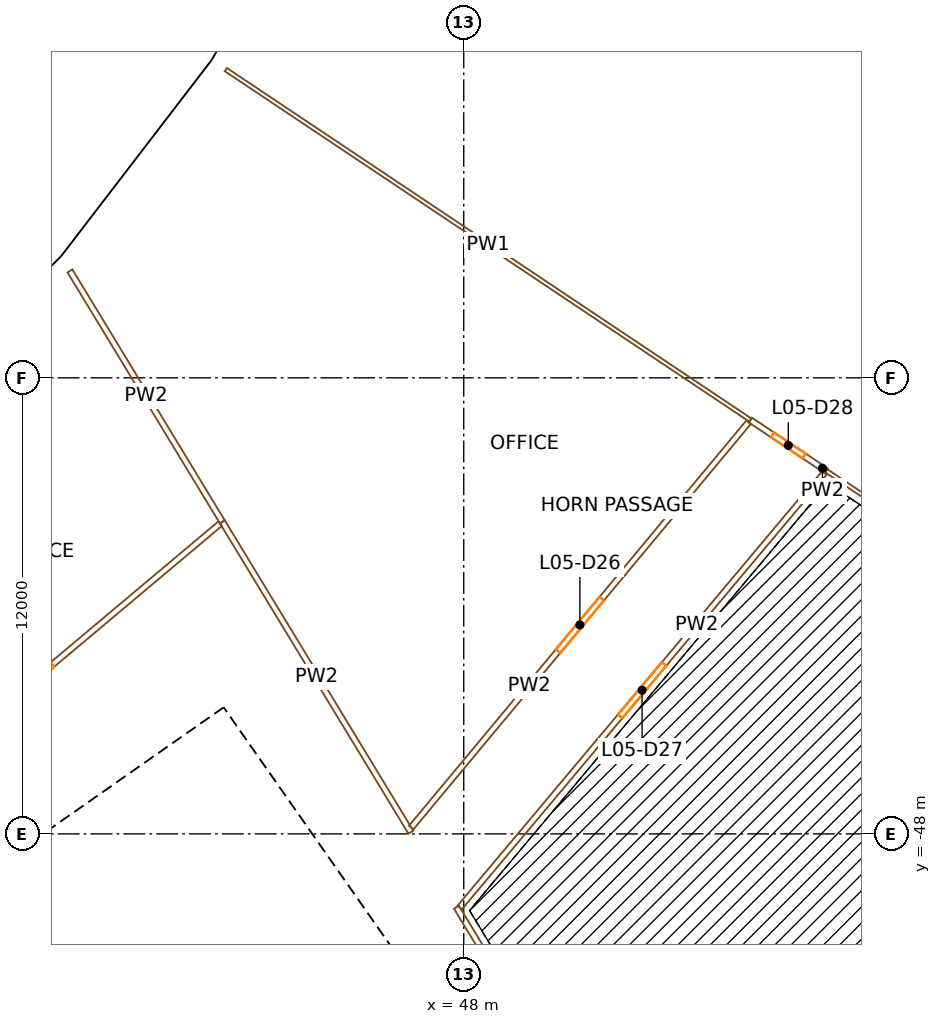
"""IFC4 building model, lengths in metres.
Left out: names, types, materials, properties, quantities, classifications, styles, units other than length and angle.
Written with IfcOpenShell. Run it as: python <this file> out.ifc"""

import sys

from ifc_helpers import new_model, si_unit, direction, frame, frame_2d, origin, origin_2d, place, context, subcontext, project, spatial, rectangle, extrude, element, fill, save


model = new_model("IFC4")
c1 = context("Model", 3, precision=1e-05, world=origin(), true_north=direction((0.0, 1.0)))
c2 = subcontext(c1, "Body", "Model", "MODEL_VIEW")
j1 = project(units=[si_unit("LENGTHUNIT", "METRE"), si_unit("PLANEANGLEUNIT", "RADIAN")], contexts=[c1])
p1 = place(None, origin())
s1 = spatial("IfcSite", under=j1, at=p1, CompositionType="ELEMENT")
p2 = place(p1, origin())
s2 = spatial("IfcBuilding", under=s1, at=p2, CompositionType="ELEMENT")
p3 = place(p2, frame((0.0, 0.0, 36.0)))
s3 = spatial("IfcBuildingStorey", under=s2, at=p3, CompositionType="ELEMENT", Elevation=36.0)
p4 = place(p3, frame((38.407, -43.795, 0.0), z_axis=(0.0, 0.0, 1.0), x_axis=(0.751839807479, 0.6593458151, 0.0)))
e1 = element("IfcColumn", 1, at=p4, inside=s3, PredefinedType="COLUMN", context=c2, shape_type="SweptSolid", body=[
    extrude(rectangle(XDim=1.4, YDim=1.8, at=origin_2d()), origin(), (0.0, 0.0, 1.0), 4.5),
])
p5 = place(p3, frame((38.156, -33.462, 0.0), z_axis=(0.0, 0.0, 1.0), x_axis=(0.6593458151, 0.751839807479, 0.0)))
e2 = element("IfcColumn", 2, at=p5, inside=s3, PredefinedType="COLUMN", context=c2, shape_type="SweptSolid", body=[
    extrude(rectangle(XDim=1.1, YDim=1.3, at=origin_2d()), origin(), (0.0, 0.0, 1.0), 4.5),
])
for number, where, z_axis, x_axis in (
    (3, (43.795, -38.407, 0.0), (0.0, 0.0, 1.0), (0.659, 0.752, 0.0)),
    (4, (58.456, -51.264, 0.0), (0.0, 0.0, 1.0), (0.659, 0.752, 0.0)),
):
    element("IfcColumn", number, at=place(p3, frame(where, z_axis=z_axis, x_axis=x_axis)), inside=s3, PredefinedType="COLUMN", context=c2, shape_type="SweptSolid", body=[
        extrude(rectangle(XDim=1.4, YDim=1.8, at=origin_2d()), origin(), (0.0, 0.0, 1.0), 4.5),
    ])
p6 = place(p3, frame((42.197, -28.195, 0.0), z_axis=(0.0, 0.0, 1.0), x_axis=(0.55557023302, 0.831469612303, 0.0)))
e5 = element("IfcColumn", 5, at=p6, inside=s3, PredefinedType="COLUMN", context=c2, shape_type="SweptSolid", body=[
    extrude(rectangle(XDim=1.1, YDim=1.3, at=origin_2d()), origin(), (0.0, 0.0, 1.0), 4.5),
])
p7 = place(p3, frame((48.433, -32.362, 0.0), z_axis=(0.0, 0.0, 1.0), x_axis=(0.55557023302, 0.831469612303, 0.0)))
e6 = element("IfcColumn", 6, at=p7, inside=s3, PredefinedType="COLUMN", context=c2, shape_type="SweptSolid", body=[
    extrude(rectangle(XDim=1.4, YDim=1.8, at=origin_2d()), origin(), (0.0, 0.0, 1.0), 4.5),
])
p8 = place(p3, frame((49.779, -57.191, 0.0), z_axis=(0.0, 0.0, 1.0), x_axis=(-0.573577477574, 0.819151315216, 0.0)))
e7 = element("IfcWall", 7, at=p8, inside=s3, PredefinedType="SHEAR", context=c2, shape_type="SweptSolid", body=[
    extrude(rectangle(XDim=14.8, YDim=0.9, at=frame_2d((7.4, 0.0))), origin(), (0.0, 0.0, 1.0), 4.2),
])
p9 = place(p8, frame((6.7, 0.0, 0.0)))
e8 = element("IfcOpeningElement", 8, at=p9, cuts=e7, PredefinedType="OPENING", context=c2, shape_type="SweptSolid", body=[
    extrude(rectangle(XDim=1.4, YDim=2.1, at=frame_2d((0.7, 1.05))), frame((0.0, 0.46, 0.0), z_axis=(0.0, -1.0, 0.0), x_axis=(1.0, 0.0, 0.0)), (0.0, 0.0, 1.0), 0.92),
])
p10 = place(p3, frame((28.854, -54.324, 0.0), z_axis=(0.0, 0.0, 1.0), x_axis=(0.819145767589, 0.573585400304, 0.0)))
e9 = element("IfcWall", 9, at=p10, inside=s3, PredefinedType="SHEAR", context=c2, shape_type="SweptSolid", body=[
    extrude(rectangle(XDim=15.045, YDim=0.9, at=frame_2d((7.523, 0.0))), origin(), (0.0, 0.0, 1.0), 4.2),
])
p11 = place(p10, frame((1.05, 0.0, 0.0)))
e10 = element("IfcOpeningElement", 10, at=p11, cuts=e9, PredefinedType="OPENING", context=c2, shape_type="SweptSolid", body=[
    extrude(rectangle(XDim=0.9, YDim=2.1, at=frame_2d((0.45, 1.05))), frame((0.0, 0.46, 0.0), z_axis=(0.0, -1.0, 0.0), x_axis=(1.0, 0.0, 0.0)), (0.0, 0.0, 1.0), 0.92),
])
p12 = place(p10, frame((3.775, 0.0, 0.0)))
e11 = element("IfcOpeningElement", 11, at=p12, cuts=e9, PredefinedType="OPENING", context=c2, shape_type="SweptSolid", body=[
    extrude(rectangle(XDim=1.0, YDim=2.1, at=frame_2d((0.5, 1.05))), frame((0.0, 0.46, 0.0), z_axis=(0.0, -1.0, 0.0), x_axis=(1.0, 0.0, 0.0)), (0.0, 0.0, 1.0), 0.92),
])
p13 = place(p10, frame((6.275, 0.0, 0.0)))
e12 = element("IfcOpeningElement", 12, at=p13, cuts=e9, PredefinedType="OPENING", context=c2, shape_type="SweptSolid", body=[
    extrude(rectangle(XDim=1.0, YDim=2.1, at=frame_2d((0.5, 1.05))), frame((0.0, 0.46, 0.0), z_axis=(0.0, -1.0, 0.0), x_axis=(1.0, 0.0, 0.0)), (0.0, 0.0, 1.0), 0.92),
])
p14 = place(p10, frame((13.495, 0.0, 0.0)))
e13 = element("IfcOpeningElement", 13, at=p14, cuts=e9, PredefinedType="OPENING", context=c2, shape_type="SweptSolid", body=[
    extrude(rectangle(XDim=1.1, YDim=2.1, at=frame_2d((0.55, 1.05))), frame((0.0, 0.46, 0.0), z_axis=(0.0, -1.0, 0.0), x_axis=(1.0, 0.0, 0.0)), (0.0, 0.0, 1.0), 0.92),
])
p15 = place(p3, frame((43.204, -60.696, 0.0), z_axis=(0.0, 0.0, 1.0), x_axis=(-0.573571992966, 0.819155155563, 0.0)))
e14 = element("IfcWall", 14, at=p15, inside=s3, PredefinedType="SOLIDWALL", context=c2, shape_type="SweptSolid", body=[
    extrude(rectangle(XDim=13.0, YDim=0.3, at=frame_2d((6.5, 0.0))), origin(), (0.0, 0.0, 1.0), 4.2),
])
p16 = place(p3, frame((37.936, -52.91, 0.0), z_axis=(0.0, 0.0, 1.0), x_axis=(0.819147518138, 0.57358290031, 0.0)))
e15 = element("IfcWall", 15, at=p16, inside=s3, PredefinedType="SOLIDWALL", context=c2, shape_type="SweptSolid", body=[
    extrude(rectangle(XDim=6.795, YDim=0.3, at=frame_2d((3.398, 0.0))), origin(), (0.0, 0.0, 1.0), 4.2),
])
p17 = place(p16, frame((5.32, 0.0, 0.0)))
e16 = element("IfcOpeningElement", 16, at=p17, cuts=e15, PredefinedType="OPENING", context=c2, shape_type="SweptSolid", body=[
    extrude(rectangle(XDim=1.1, YDim=2.1, at=frame_2d((0.55, 1.05))), frame((0.0, 0.16, 0.0), z_axis=(0.0, -1.0, 0.0), x_axis=(1.0, 0.0, 0.0)), (0.0, 0.0, 1.0), 0.32),
])
p18 = place(p3, frame((37.532, -32.993, 0.0), z_axis=(0.0, 0.0, 1.0), x_axis=(-0.707106781187, -0.707106781187, 0.0)))
e17 = element("IfcWall", 17, at=p18, inside=s3, PredefinedType="SOLIDWALL", context=c2, shape_type="SweptSolid", body=[
    extrude(rectangle(XDim=6.419, YDim=0.45, at=frame_2d((3.209, 0.0))), origin(), (0.0, 0.0, 1.0), 3.2),
])
p19 = place(p18, frame((3.66, 0.0, 0.9)))
e18 = element("IfcOpeningElement", 18, at=p19, cuts=e17, PredefinedType="OPENING", context=c2, shape_type="SweptSolid", body=[
    extrude(rectangle(XDim=1.2, YDim=2.15, at=frame_2d((0.6, 1.075))), frame((0.0, 0.235, 0.0), z_axis=(0.0, -1.0, 0.0), x_axis=(1.0, 0.0, 0.0)), (0.0, 0.0, 1.0), 0.47),
])
p20 = place(p18, frame((1.56, 0.0, 0.9)))
e19 = element("IfcOpeningElement", 19, at=p20, cuts=e17, PredefinedType="OPENING", context=c2, shape_type="SweptSolid", body=[
    extrude(rectangle(XDim=1.2, YDim=2.15, at=frame_2d((0.6, 1.075))), frame((0.0, 0.235, 0.0), z_axis=(0.0, -1.0, 0.0), x_axis=(1.0, 0.0, 0.0)), (0.0, 0.0, 1.0), 0.47),
])
p21 = place(p3, frame((41.571, -27.741, 0.0), z_axis=(0.0, 0.0, 1.0), x_axis=(-0.608780327927, -0.793338838284, 0.0)))
e20 = element("IfcWall", 20, at=p21, inside=s3, PredefinedType="SOLIDWALL", context=c2, shape_type="SweptSolid", body=[
    extrude(rectangle(XDim=6.597, YDim=0.45, at=frame_2d((3.298, 0.0))), origin(), (0.0, 0.0, 1.0), 3.2),
])
p22 = place(p21, frame((3.749, 0.0, 0.9)))
e21 = element("IfcOpeningElement", 21, at=p22, cuts=e20, PredefinedType="OPENING", context=c2, shape_type="SweptSolid", body=[
    extrude(rectangle(XDim=1.2, YDim=2.15, at=frame_2d((0.6, 1.075))), frame((0.0, 0.235, 0.0), z_axis=(0.0, -1.0, 0.0), x_axis=(1.0, 0.0, 0.0)), (0.0, 0.0, 1.0), 0.47),
])
p23 = place(p21, frame((1.648, 0.0, 0.9)))
e22 = element("IfcOpeningElement", 22, at=p23, cuts=e20, PredefinedType="OPENING", context=c2, shape_type="SweptSolid", body=[
    extrude(rectangle(XDim=1.2, YDim=2.15, at=frame_2d((0.6, 1.075))), frame((0.0, 0.235, 0.0), z_axis=(0.0, -1.0, 0.0), x_axis=(1.0, 0.0, 0.0)), (0.0, 0.0, 1.0), 0.47),
])
p24 = place(p3, frame((44.792, -22.155, 0.0), z_axis=(0.0, 0.0, 1.0), x_axis=(-0.50000447882, -0.866022817921, 0.0)))
e23 = element("IfcWall", 23, at=p24, inside=s3, PredefinedType="SOLIDWALL", context=c2, shape_type="SweptSolid", body=[
    extrude(rectangle(XDim=6.419, YDim=0.45, at=frame_2d((3.21, 0.0))), origin(), (0.0, 0.0, 1.0), 3.2),
])
p25 = place(p24, frame((3.66, 0.0, 0.9)))
e24 = element("IfcOpeningElement", 24, at=p25, cuts=e23, PredefinedType="OPENING", context=c2, shape_type="SweptSolid", body=[
    extrude(rectangle(XDim=1.2, YDim=2.15, at=frame_2d((0.6, 1.075))), frame((0.0, 0.235, 0.0), z_axis=(0.0, -1.0, 0.0), x_axis=(1.0, 0.0, 0.0)), (0.0, 0.0, 1.0), 0.47),
])
p26 = place(p24, frame((1.56, 0.0, 0.9)))
e25 = element("IfcOpeningElement", 25, at=p26, cuts=e23, PredefinedType="OPENING", context=c2, shape_type="SweptSolid", body=[
    extrude(rectangle(XDim=1.2, YDim=2.15, at=frame_2d((0.6, 1.075))), frame((0.0, 0.235, 0.0), z_axis=(0.0, -1.0, 0.0), x_axis=(1.0, 0.0, 0.0)), (0.0, 0.0, 1.0), 0.47),
])
p27 = place(p3, frame((32.001, -47.893, 0.0), z_axis=(0.0, 0.0, 1.0), x_axis=(0.765734049768, 0.643157340801, 0.0)))
e26 = element("IfcWall", 26, at=p27, inside=s3, PredefinedType="PARTITIONING", context=c2, shape_type="SweptSolid", body=[
    extrude(rectangle(XDim=12.524, YDim=0.15, at=frame_2d((6.262, 0.0))), origin(), (0.0, 0.0, 1.0), 3.1),
])
p28 = place(p27, frame((5.762, 0.0, 0.0)))
e27 = element("IfcOpeningElement", 27, at=p28, cuts=e26, PredefinedType="OPENING", context=c2, shape_type="SweptSolid", body=[
    extrude(rectangle(XDim=1.0, YDim=2.1, at=frame_2d((0.5, 1.05))), frame((0.0, 0.085, 0.0), z_axis=(0.0, -1.0, 0.0), x_axis=(1.0, 0.0, 0.0)), (0.0, 0.0, 1.0), 0.17),
])
p29 = place(p3, frame((37.638, -33.187, 0.0), z_axis=(0.0, 0.0, 1.0), x_axis=(0.519163683086, -0.854674833, 0.0)))
e28 = element("IfcWall", 28, at=p29, inside=s3, PredefinedType="PARTITIONING", context=c2, shape_type="SweptSolid", body=[
    extrude(rectangle(XDim=7.725, YDim=0.15, at=frame_2d((3.862, 0.0))), origin(), (0.0, 0.0, 1.0), 3.1),
])
p30 = place(p3, frame((41.648, -39.789, 0.0), z_axis=(0.0, 0.0, 1.0), x_axis=(0.519144162426, -0.854686690325, 0.0)))
e29 = element("IfcWall", 29, at=p30, inside=s3, PredefinedType="PARTITIONING", context=c2, shape_type="SweptSolid", body=[
    extrude(rectangle(XDim=9.554, YDim=0.15, at=frame_2d((4.777, 0.0))), origin(), (0.0, 0.0, 1.0), 3.1),
])
p31 = place(p3, frame((46.617, -47.833, 0.0), z_axis=(0.0, 0.0, 1.0), x_axis=(0.639786242962, 0.768552902093, 0.0)))
e30 = element("IfcWall", 30, at=p31, inside=s3, PredefinedType="PARTITIONING", context=c2, shape_type="SweptSolid", body=[
    extrude(rectangle(XDim=13.875, YDim=0.15, at=frame_2d((6.938, 0.0))), origin(), (0.0, 0.0, 1.0), 3.1),
])
p32 = place(p31, frame((6.037, 0.0, 0.0)))
e31 = element("IfcOpeningElement", 31, at=p32, cuts=e30, PredefinedType="OPENING", context=c2, shape_type="SweptSolid", body=[
    extrude(rectangle(XDim=1.8, YDim=2.1, at=frame_2d((0.9, 1.05))), frame((0.0, 0.085, 0.0), z_axis=(0.0, -1.0, 0.0), x_axis=(1.0, 0.0, 0.0)), (0.0, 0.0, 1.0), 0.17),
])
p33 = place(p3, frame((47.808, -49.929, 0.0), z_axis=(0.0, 0.0, 1.0), x_axis=(0.519169679695, -0.854671190392, 0.0)))
e32 = element("IfcWall", 32, at=p33, inside=s3, PredefinedType="PARTITIONING", context=c2, shape_type="SweptSolid", body=[
    extrude(rectangle(XDim=9.878, YDim=0.15, at=frame_2d((4.939, 0.0))), origin(), (0.0, 0.0, 1.0), 3.1),
])
p34 = place(p3, frame((57.49, -38.503, 0.0), z_axis=(0.0, 0.0, 1.0), x_axis=(-0.642835259292, -0.766004457828, 0.0)))
e33 = element("IfcWall", 33, at=p34, inside=s3, PredefinedType="PARTITIONING", context=c2, shape_type="SweptSolid", body=[
    extrude(rectangle(XDim=14.926, YDim=0.15, at=frame_2d((7.463, 0.0))), origin(), (0.0, 0.0, 1.0), 3.1),
])
p35 = place(p34, frame((6.563, 0.0, 0.0)))
e34 = element("IfcOpeningElement", 34, at=p35, cuts=e33, PredefinedType="OPENING", context=c2, shape_type="SweptSolid", body=[
    extrude(rectangle(XDim=1.8, YDim=2.1, at=frame_2d((0.9, 1.05))), frame((0.0, 0.085, 0.0), z_axis=(0.0, -1.0, 0.0), x_axis=(1.0, 0.0, 0.0)), (0.0, 0.0, 1.0), 0.17),
])
p36 = place(p3, frame((55.542, -37.112, 0.0), z_axis=(0.0, 0.0, 1.0), x_axis=(-0.831472868546, 0.555565359677, 0.0)))
e35 = element("IfcWall", 35, at=p36, inside=s3, PredefinedType="PARTITIONING", context=c2, shape_type="SweptSolid", body=[
    extrude(rectangle(XDim=16.6, YDim=0.1, at=frame_2d((8.3, 0.0))), origin(), (0.0, 0.0, 1.0), 3.1),
])
p37 = place(p3, frame((55.542, -37.112, 0.0), z_axis=(0.0, 0.0, 1.0), x_axis=(0.831423745392, -0.555638871569, 0.0)))
e36 = element("IfcWall", 36, at=p37, inside=s3, PredefinedType="PARTITIONING", context=c2, shape_type="SweptSolid", body=[
    extrude(rectangle(XDim=2.4, YDim=0.15, at=frame_2d((1.2, 0.0))), origin(), (0.0, 0.0, 1.0), 3.1),
])
p38 = place(p37, frame((0.7, 0.0, 0.0)))
e37 = element("IfcOpeningElement", 37, at=p38, cuts=e36, PredefinedType="OPENING", context=c2, shape_type="SweptSolid", body=[
    extrude(rectangle(XDim=1.0, YDim=2.1, at=frame_2d((0.5, 1.05))), frame((0.0, 0.085, 0.0), z_axis=(0.0, -1.0, 0.0), x_axis=(1.0, 0.0, 0.0)), (0.0, 0.0, 1.0), 0.17),
])
p39 = place(p3, frame((71.34, -47.668, 0.0), z_axis=(0.0, 0.0, 1.0), x_axis=(-0.831472868546, 0.555565359677, 0.0)))
e38 = element("IfcWall", 38, at=p39, inside=s3, PredefinedType="PARTITIONING", context=c2, shape_type="SweptSolid", body=[
    extrude(rectangle(XDim=16.6, YDim=0.1, at=frame_2d((8.3, 0.0))), origin(), (0.0, 0.0, 1.0), 3.1),
])
p40 = place(p9, origin())
e39 = element("IfcDoor", 39, at=p40, inside=s3, OperationType="DOUBLE_DOOR_SINGLE_SWING", PredefinedType="DOOR", context=c2, shape_type="SweptSolid", body=[
    extrude(rectangle(XDim=1.4, YDim=2.1, at=frame_2d((0.7, 1.05))), frame((0.0, 0.025, 0.0), z_axis=(0.0, -1.0, 0.0), x_axis=(1.0, 0.0, 0.0)), (0.0, 0.0, 1.0), 0.05),
])
fill(e8, e39)
p41 = place(p14, origin())
e40 = element("IfcDoor", 40, at=p41, inside=s3, OperationType="SINGLE_SWING_RIGHT", PredefinedType="DOOR", context=c2, shape_type="SweptSolid", body=[
    extrude(rectangle(XDim=1.1, YDim=2.1, at=frame_2d((0.55, 1.05))), frame((0.0, 0.025, 0.0), z_axis=(0.0, -1.0, 0.0), x_axis=(1.0, 0.0, 0.0)), (0.0, 0.0, 1.0), 0.05),
])
fill(e13, e40)
p42 = place(p17, origin())
e41 = element("IfcDoor", 41, at=p42, inside=s3, OperationType="SINGLE_SWING_LEFT", PredefinedType="DOOR", context=c2, shape_type="SweptSolid", body=[
    extrude(rectangle(XDim=1.1, YDim=2.1, at=frame_2d((0.55, 1.05))), frame((0.0, 0.025, 0.0), z_axis=(0.0, -1.0, 0.0), x_axis=(1.0, 0.0, 0.0)), (0.0, 0.0, 1.0), 0.05),
])
fill(e16, e41)
p43 = place(p22, origin())
e42 = element("IfcWindow", 42, at=p43, inside=s3, PartitioningType="SINGLE_PANEL", PredefinedType="WINDOW", context=c2, shape_type="SweptSolid", body=[
    extrude(rectangle(XDim=1.2, YDim=2.15, at=frame_2d((0.6, 1.075))), frame((0.0, 0.03, 0.0), z_axis=(0.0, -1.0, 0.0), x_axis=(1.0, 0.0, 0.0)), (0.0, 0.0, 1.0), 0.06),
])
fill(e21, e42)
p44 = place(p23, origin())
e43 = element("IfcWindow", 43, at=p44, inside=s3, PartitioningType="SINGLE_PANEL", PredefinedType="WINDOW", context=c2, shape_type="SweptSolid", body=[
    extrude(rectangle(XDim=1.2, YDim=2.15, at=frame_2d((0.6, 1.075))), frame((0.0, 0.03, 0.0), z_axis=(0.0, -1.0, 0.0), x_axis=(1.0, 0.0, 0.0)), (0.0, 0.0, 1.0), 0.06),
])
fill(e22, e43)
p45 = place(p28, origin())
e44 = element("IfcDoor", 44, at=p45, inside=s3, OperationType="SINGLE_SWING_RIGHT", PredefinedType="DOOR", context=c2, shape_type="SweptSolid", body=[
    extrude(rectangle(XDim=1.0, YDim=2.1, at=frame_2d((0.5, 1.05))), frame((0.0, 0.025, 0.0), z_axis=(0.0, -1.0, 0.0), x_axis=(1.0, 0.0, 0.0)), (0.0, 0.0, 1.0), 0.05),
])
fill(e27, e44)
p46 = place(p32, origin())
e45 = element("IfcDoor", 45, at=p46, inside=s3, OperationType="DOUBLE_DOOR_SINGLE_SWING", PredefinedType="DOOR", context=c2, shape_type="SweptSolid", body=[
    extrude(rectangle(XDim=1.8, YDim=2.1, at=frame_2d((0.9, 1.05))), frame((0.0, 0.025, 0.0), z_axis=(0.0, -1.0, 0.0), x_axis=(1.0, 0.0, 0.0)), (0.0, 0.0, 1.0), 0.05),
])
fill(e31, e45)
p47 = place(p35, origin())
e46 = element("IfcDoor", 46, at=p47, inside=s3, OperationType="DOUBLE_DOOR_SINGLE_SWING", PredefinedType="DOOR", context=c2, shape_type="SweptSolid", body=[
    extrude(rectangle(XDim=1.8, YDim=2.1, at=frame_2d((0.9, 1.05))), frame((0.0, 0.025, 0.0), z_axis=(0.0, -1.0, 0.0), x_axis=(1.0, 0.0, 0.0)), (0.0, 0.0, 1.0), 0.05),
])
fill(e34, e46)
p48 = place(p38, origin())
e47 = element("IfcDoor", 47, at=p48, inside=s3, OperationType="SINGLE_SWING_RIGHT", PredefinedType="DOOR", context=c2, shape_type="SweptSolid", body=[
    extrude(rectangle(XDim=1.0, YDim=2.1, at=frame_2d((0.5, 1.05))), frame((0.0, 0.025, 0.0), z_axis=(0.0, -1.0, 0.0), x_axis=(1.0, 0.0, 0.0)), (0.0, 0.0, 1.0), 0.05),
])
fill(e37, e47)
save(model, sys.argv[1])
